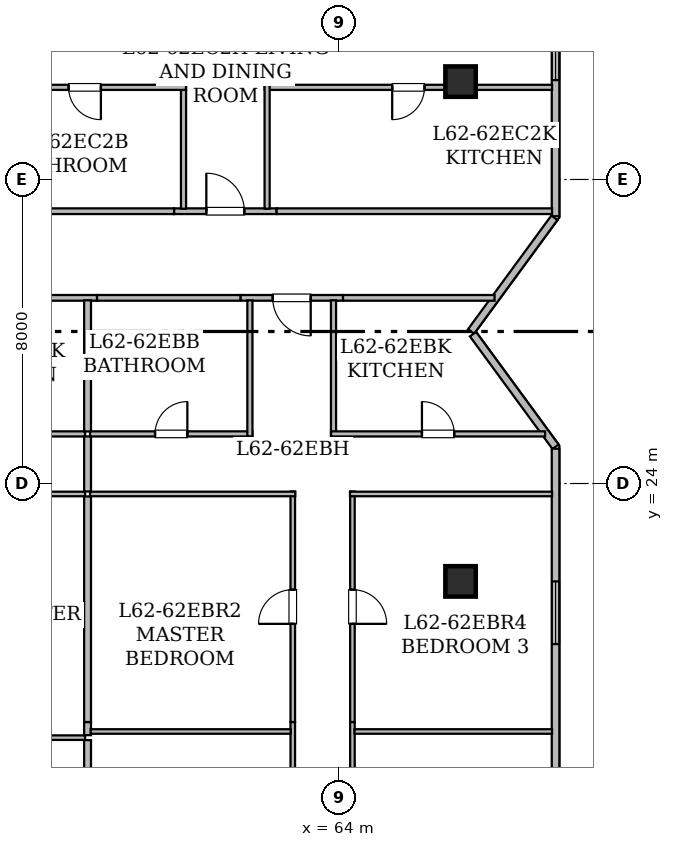
"""IFC4 building model, lengths in metres.
Left out: names, types, materials, properties, quantities, classifications, styles, units other than length and angle.
Written with IfcOpenShell. Run it as: python <this file> out.ifc"""

import sys

from ifc_helpers import new_model, si_unit, direction, frame, frame_2d, origin, origin_2d, place, context, subcontext, project, spatial, rectangle, hollow_rectangle, extrude, element, fill, save


model = new_model("IFC4")
c1 = context("Model", 3, precision=1e-05, world=origin(), true_north=direction((0.0, 1.0)))
c2 = subcontext(c1, "Body", "Model", "MODEL_VIEW")
j1 = project(units=[si_unit("LENGTHUNIT", "METRE"), si_unit("PLANEANGLEUNIT", "RADIAN")], contexts=[c1])
p1 = place(None, origin())
s1 = spatial("IfcSite", under=j1, at=p1, CompositionType="ELEMENT")
p2 = place(p1, origin())
s2 = spatial("IfcBuilding", under=s1, at=p2, CompositionType="ELEMENT")
p3 = place(p2, frame((0.0, 0.0, 242.75)))
s3 = spatial("IfcBuildingStorey", under=s2, at=p3, CompositionType="ELEMENT", Elevation=242.75)
for number, where, z_axis, x_axis in (
    (1, (67.2, 21.425, 0.0), (0.0, 0.0, 1.0), (1.0, 0.0, 0.0)),
    (2, (67.2, 34.575, 0.0), (0.0, 0.0, 1.0), (1.0, 0.0, 0.0)),
):
    element("IfcColumn", number, at=place(p3, frame(where, z_axis=z_axis, x_axis=x_axis)), inside=s3, PredefinedType="COLUMN", context=c2, shape_type="SweptSolid", body=[
        extrude(hollow_rectangle(XDim=0.8, YDim=0.8, WallThickness=0.04, at=origin_2d()), origin(), (0.0, 0.0, 1.0), 3.65),
    ])
p4 = place(p3, frame((69.7, 39.896, 0.0), z_axis=(0.0, 0.0, 1.0), x_axis=(0.0, -1.0, 0.0)))
e3 = element("IfcWall", 3, at=p4, inside=s3, PredefinedType="STANDARD", context=c2, shape_type="SweptSolid", body=[
    extrude(rectangle(XDim=8.863, YDim=0.2, at=frame_2d((4.432, 0.0))), origin(), (0.0, 0.0, 1.0), 3.43),
])
p5 = place(p4, frame((4.082, 0.0, 0.8)))
e4 = element("IfcOpeningElement", 4, at=p5, cuts=e3, PredefinedType="OPENING", context=c2, shape_type="SweptSolid", body=[
    extrude(rectangle(XDim=1.2, YDim=1.5, at=frame_2d((0.6, 0.75))), frame((0.0, 0.11, 0.0), z_axis=(0.0, -1.0, 0.0), x_axis=(1.0, 0.0, 0.0)), (0.0, 0.0, 1.0), 0.22),
])
p6 = place(p4, frame((1.513, 0.0, 0.85)))
e5 = element("IfcOpeningElement", 5, at=p6, cuts=e3, PredefinedType="OPENING", context=c2, shape_type="SweptSolid", body=[
    extrude(rectangle(XDim=1.65, YDim=1.55, at=frame_2d((0.825, 0.775))), frame((0.0, 0.11, 0.0), z_axis=(0.0, -1.0, 0.0), x_axis=(1.0, 0.0, 0.0)), (0.0, 0.0, 1.0), 0.22),
])
p7 = place(p3, frame((69.67, 30.992, 0.0), z_axis=(0.0, 0.0, 1.0), x_axis=(-0.591320870733, -0.806436375566, 0.0)))
e6 = element("IfcWall", 6, at=p7, inside=s3, PredefinedType="STANDARD", context=c2, shape_type="SweptSolid", body=[
    extrude(rectangle(XDim=3.71, YDim=0.2, at=frame_2d((1.855, 0.0))), origin(), (0.0, 0.0, 1.0), 3.43),
])
p8 = place(p3, frame((67.527, 27.931, 0.0), z_axis=(0.0, 0.0, 1.0), x_axis=(0.591248456881, -0.80648946815, 0.0)))
e7 = element("IfcWall", 7, at=p8, inside=s3, PredefinedType="STANDARD", context=c2, shape_type="SweptSolid", body=[
    extrude(rectangle(XDim=3.675, YDim=0.2, at=frame_2d((1.837, 0.0))), origin(), (0.0, 0.0, 1.0), 3.43),
])
p9 = place(p3, frame((69.7, 24.916, 0.0), z_axis=(0.0, 0.0, 1.0), x_axis=(0.0, -1.0, 0.0)))
e8 = element("IfcWall", 8, at=p9, inside=s3, PredefinedType="STANDARD", context=c2, shape_type="SweptSolid", body=[
    extrude(rectangle(XDim=8.875, YDim=0.2, at=frame_2d((4.438, 0.0))), origin(), (0.0, 0.0, 1.0), 3.43),
])
p10 = place(p9, frame((3.491, 0.0, 0.85)))
e9 = element("IfcOpeningElement", 9, at=p10, cuts=e8, PredefinedType="OPENING", context=c2, shape_type="SweptSolid", body=[
    extrude(rectangle(XDim=1.65, YDim=1.55, at=frame_2d((0.825, 0.775))), frame((0.0, 0.11, 0.0), z_axis=(0.0, -1.0, 0.0), x_axis=(1.0, 0.0, 0.0)), (0.0, 0.0, 1.0), 0.22),
])
p11 = place(p3, frame((57.634, 28.885, 0.0), z_axis=(0.0, 0.0, 1.0), x_axis=(-1.0, 0.0, 0.0)))
e10 = element("IfcWall", 10, at=p11, inside=s3, PredefinedType="STANDARD", context=c2, shape_type="SweptSolid", body=[
    extrude(rectangle(XDim=7.935, YDim=0.15, at=frame_2d((3.968, 0.0))), origin(), (0.0, 0.0, 1.0), 2.725),
])
p12 = place(p3, frame((64.107, 28.885, 0.0), z_axis=(0.0, 0.0, 1.0), x_axis=(-1.0, 0.0, 0.0)))
e11 = element("IfcWall", 11, at=p12, inside=s3, PredefinedType="STANDARD", context=c2, shape_type="SweptSolid", body=[
    extrude(rectangle(XDim=2.699, YDim=0.15, at=frame_2d((1.35, 0.0))), origin(), (0.0, 0.0, 1.0), 3.43),
])
p13 = place(p12, frame((0.85, 0.0, 0.0)))
e12 = element("IfcOpeningElement", 12, at=p13, cuts=e11, PredefinedType="OPENING", context=c2, shape_type="SweptSolid", body=[
    extrude(rectangle(XDim=1.0, YDim=2.15, at=frame_2d((0.5, 1.075))), frame((0.0, 0.085, 0.0), z_axis=(0.0, -1.0, 0.0), x_axis=(1.0, 0.0, 0.0)), (0.0, 0.0, 1.0), 0.17),
])
p14 = place(p3, frame((61.408, 28.885, 0.0), z_axis=(0.0, 0.0, 1.0), x_axis=(-1.0, 0.0, 0.0)))
e13 = element("IfcWall", 13, at=p14, inside=s3, PredefinedType="STANDARD", context=c2, shape_type="SweptSolid", body=[
    extrude(rectangle(XDim=3.774, YDim=0.15, at=frame_2d((1.887, 0.0))), origin(), (0.0, 0.0, 1.0), 3.43),
])
p15 = place(p3, frame((68.096, 28.885, 0.0), z_axis=(0.0, 0.0, 1.0), x_axis=(-1.0, 0.0, 0.0)))
e14 = element("IfcWall", 14, at=p15, inside=s3, PredefinedType="STANDARD", context=c2, shape_type="SweptSolid", body=[
    extrude(rectangle(XDim=3.989, YDim=0.15, at=frame_2d((1.995, 0.0))), origin(), (0.0, 0.0, 1.0), 2.887),
])
p16 = place(p3, frame((59.661, 31.165, 0.0), z_axis=(0.0, 0.0, 1.0), x_axis=(1.0, 0.0, 0.0)))
e15 = element("IfcWall", 15, at=p16, inside=s3, PredefinedType="STANDARD", context=c2, shape_type="SweptSolid", body=[
    extrude(rectangle(XDim=2.698, YDim=0.15, at=frame_2d((1.349, 0.0))), origin(), (0.0, 0.0, 1.0), 3.43),
])
p17 = place(p16, frame((0.849, 0.0, 0.0)))
e16 = element("IfcOpeningElement", 16, at=p17, cuts=e15, PredefinedType="OPENING", context=c2, shape_type="SweptSolid", body=[
    extrude(rectangle(XDim=1.0, YDim=2.15, at=frame_2d((0.5, 1.075))), frame((0.0, 0.085, 0.0), z_axis=(0.0, -1.0, 0.0), x_axis=(1.0, 0.0, 0.0)), (0.0, 0.0, 1.0), 0.17),
])
p18 = place(p3, frame((54.814, 31.165, 0.0), z_axis=(0.0, 0.0, 1.0), x_axis=(1.0, 0.0, 0.0)))
e17 = element("IfcWall", 17, at=p18, inside=s3, PredefinedType="STANDARD", context=c2, shape_type="SweptSolid", body=[
    extrude(rectangle(XDim=4.847, YDim=0.15, at=frame_2d((2.423, 0.0))), origin(), (0.0, 0.0, 1.0), 3.43),
])
p19 = place(p3, frame((62.359, 31.165, 0.0), z_axis=(0.0, 0.0, 1.0), x_axis=(1.0, 0.0, 0.0)))
e18 = element("IfcWall", 18, at=p19, inside=s3, PredefinedType="STANDARD", context=c2, shape_type="SweptSolid", body=[
    extrude(rectangle(XDim=7.249, YDim=0.15, at=frame_2d((3.625, 0.0))), origin(), (0.0, 0.0, 1.0), 2.887),
])
p20 = place(p3, frame((49.385, 25.305, 0.0), z_axis=(0.0, 0.0, 1.0), x_axis=(1.0, 0.0, 0.0)))
e19 = element("IfcWall", 19, at=p20, inside=s3, PredefinedType="PARTITIONING", context=c2, shape_type="SweptSolid", body=[
    extrude(rectangle(XDim=7.935, YDim=0.135, at=frame_2d((3.968, 0.0))), origin(), (0.0, 0.0, 1.0), 2.725),
])
p21 = place(p20, frame((3.542, 0.0, 0.0)))
e20 = element("IfcOpeningElement", 20, at=p21, cuts=e19, PredefinedType="OPENING", context=c2, shape_type="SweptSolid", body=[
    extrude(rectangle(XDim=0.85, YDim=2.1, at=frame_2d((0.425, 1.05))), frame((0.0, 0.077, 0.0), z_axis=(0.0, -1.0, 0.0), x_axis=(1.0, 0.0, 0.0)), (0.0, 0.0, 1.0), 0.155),
])
p22 = place(p3, frame((57.32, 23.725, 0.0), z_axis=(0.0, 0.0, 1.0), x_axis=(-1.0, 0.0, 0.0)))
e21 = element("IfcWall", 21, at=p22, inside=s3, PredefinedType="PARTITIONING", context=c2, shape_type="SweptSolid", body=[
    extrude(rectangle(XDim=7.1, YDim=0.12, at=frame_2d((3.55, 0.0))), origin(), (0.0, 0.0, 1.0), 2.725),
])
p23 = place(p22, frame((3.1, 0.0, 0.0)))
e22 = element("IfcOpeningElement", 22, at=p23, cuts=e21, PredefinedType="OPENING", context=c2, shape_type="SweptSolid", body=[
    extrude(rectangle(XDim=0.9, YDim=2.1, at=frame_2d((0.45, 1.05))), frame((0.0, 0.07, 0.0), z_axis=(0.0, -1.0, 0.0), x_axis=(1.0, 0.0, 0.0)), (0.0, 0.0, 1.0), 0.14),
])
p24 = place(p3, frame((57.385, 25.24, 0.0), z_axis=(0.0, 0.0, 1.0), x_axis=(0.0, -1.0, 0.0)))
e23 = element("IfcWall", 23, at=p24, inside=s3, PredefinedType="STANDARD", context=c2, shape_type="SweptSolid", body=[
    extrude(rectangle(XDim=1.45, YDim=0.18, at=frame_2d((0.725, 0.0))), origin(), (0.0, 0.0, 1.0), 3.43),
])
p25 = place(p3, frame((57.385, 28.82, 0.0), z_axis=(0.0, 0.0, 1.0), x_axis=(0.0, -1.0, 0.0)))
e24 = element("IfcWall", 24, at=p25, inside=s3, PredefinedType="STANDARD", context=c2, shape_type="SweptSolid", body=[
    extrude(rectangle(XDim=3.45, YDim=0.18, at=frame_2d((1.725, 0.0))), origin(), (0.0, 0.0, 1.0), 3.43),
])
p26 = place(p3, frame((50.339, 17.313, 0.0), z_axis=(0.0, 0.0, 1.0), x_axis=(1.0, 0.0, 0.0)))
e25 = element("IfcWall", 25, at=p26, inside=s3, PredefinedType="PARTITIONING", context=c2, shape_type="SweptSolid", body=[
    extrude(rectangle(XDim=6.981, YDim=0.12, at=frame_2d((3.49, 0.0))), origin(), (0.0, 0.0, 1.0), 2.725),
])
p27 = place(p3, frame((57.385, 17.248, 0.0), z_axis=(0.0, 0.0, 1.0), x_axis=(0.0, -1.0, 0.0)))
e26 = element("IfcWall", 26, at=p27, inside=s3, PredefinedType="STANDARD", context=c2, shape_type="SweptSolid", body=[
    extrude(rectangle(XDim=5.056, YDim=0.18, at=frame_2d((2.528, 0.0))), origin(), (0.0, 0.0, 1.0), 2.725),
])
p28 = place(p3, frame((57.385, 17.724, 0.0), z_axis=(0.0, 0.0, 1.0), x_axis=(0.0, -1.0, 0.0)))
e27 = element("IfcWall", 27, at=p28, inside=s3, PredefinedType="STANDARD", context=c2, shape_type="SweptSolid", body=[
    extrude(rectangle(XDim=0.346, YDim=0.18, at=frame_2d((0.173, 0.0))), origin(), (0.0, 0.0, 1.0), 3.43),
])
p29 = place(p3, frame((57.385, 23.66, 0.0), z_axis=(0.0, 0.0, 1.0), x_axis=(0.0, -1.0, 0.0)))
e28 = element("IfcWall", 28, at=p29, inside=s3, PredefinedType="STANDARD", context=c2, shape_type="SweptSolid", body=[
    extrude(rectangle(XDim=5.936, YDim=0.18, at=frame_2d((2.968, 0.0))), origin(), (0.0, 0.0, 1.0), 2.725),
])
p30 = place(p3, frame((57.45, 25.305, 0.0), z_axis=(0.0, 0.0, 1.0), x_axis=(1.0, 0.0, 0.0)))
e29 = element("IfcWall", 29, at=p30, inside=s3, PredefinedType="PARTITIONING", context=c2, shape_type="SweptSolid", body=[
    extrude(rectangle(XDim=4.272, YDim=0.135, at=frame_2d((2.136, 0.0))), origin(), (0.0, 0.0, 1.0), 3.43),
])
p31 = place(p30, frame((1.711, 0.0, 0.0)))
e30 = element("IfcOpeningElement", 30, at=p31, cuts=e29, PredefinedType="OPENING", context=c2, shape_type="SweptSolid", body=[
    extrude(rectangle(XDim=0.85, YDim=2.1, at=frame_2d((0.425, 1.05))), frame((0.0, 0.077, 0.0), z_axis=(0.0, -1.0, 0.0), x_axis=(1.0, 0.0, 0.0)), (0.0, 0.0, 1.0), 0.155),
])
for number, where, z_axis, x_axis in (
    (31, (61.657, 25.24, 0.0), (0.0, 0.0, 1.0), (0.0, 1.0, 0.0)),
    (32, (63.857, 28.82, 0.0), (0.0, 0.0, 1.0), (0.0, -1.0, 0.0)),
):
    element("IfcWall", number, at=place(p3, frame(where, z_axis=z_axis, x_axis=x_axis)), inside=s3, PredefinedType="PARTITIONING", context=c2, shape_type="SweptSolid", body=[
        extrude(rectangle(XDim=3.58, YDim=0.135, at=frame_2d((1.79, 0.0))), origin(), (0.0, 0.0, 1.0), 3.43),
    ])
p32 = place(p3, frame((63.792, 25.305, 0.0), z_axis=(0.0, 0.0, 1.0), x_axis=(1.0, 0.0, 0.0)))
e33 = element("IfcWall", 33, at=p32, inside=s3, PredefinedType="PARTITIONING", context=c2, shape_type="SweptSolid", body=[
    extrude(rectangle(XDim=5.633, YDim=0.135, at=frame_2d((2.816, 0.0))), origin(), (0.0, 0.0, 1.0), 2.887),
])
p33 = place(p32, frame((2.392, 0.0, 0.0)))
e34 = element("IfcOpeningElement", 34, at=p33, cuts=e33, PredefinedType="OPENING", context=c2, shape_type="SweptSolid", body=[
    extrude(rectangle(XDim=0.85, YDim=2.1, at=frame_2d((0.425, 1.05))), frame((0.0, 0.077, 0.0), z_axis=(0.0, -1.0, 0.0), x_axis=(1.0, 0.0, 0.0)), (0.0, 0.0, 1.0), 0.155),
])
p34 = place(p3, frame((62.785, 12.192, 0.0), z_axis=(0.0, 0.0, 1.0), x_axis=(0.0, 1.0, 0.0)))
e35 = element("IfcWall", 35, at=p34, inside=s3, PredefinedType="PARTITIONING", context=c2, shape_type="SweptSolid", body=[
    extrude(rectangle(XDim=5.532, YDim=0.12, at=frame_2d((2.766, 0.0))), origin(), (0.0, 0.0, 1.0), 2.725),
])
p35 = place(p34, frame((2.98, 0.0, 0.0)))
e36 = element("IfcOpeningElement", 36, at=p35, cuts=e35, PredefinedType="OPENING", context=c2, shape_type="SweptSolid", body=[
    extrude(rectangle(XDim=0.9, YDim=2.1, at=frame_2d((0.45, 1.05))), frame((0.0, 0.07, 0.0), z_axis=(0.0, -1.0, 0.0), x_axis=(1.0, 0.0, 0.0)), (0.0, 0.0, 1.0), 0.14),
])
p36 = place(p3, frame((62.785, 17.724, 0.0), z_axis=(0.0, 0.0, 1.0), x_axis=(0.0, 1.0, 0.0)))
e37 = element("IfcWall", 37, at=p36, inside=s3, PredefinedType="PARTITIONING", context=c2, shape_type="SweptSolid", body=[
    extrude(rectangle(XDim=6.066, YDim=0.12, at=frame_2d((3.033, 0.0))), origin(), (0.0, 0.0, 1.0), 2.725),
])
p37 = place(p36, frame((2.583, 0.0, 0.0)))
e38 = element("IfcOpeningElement", 38, at=p37, cuts=e37, PredefinedType="OPENING", context=c2, shape_type="SweptSolid", body=[
    extrude(rectangle(XDim=0.9, YDim=2.1, at=frame_2d((0.45, 1.05))), frame((0.0, 0.07, 0.0), z_axis=(0.0, -1.0, 0.0), x_axis=(1.0, 0.0, 0.0)), (0.0, 0.0, 1.0), 0.14),
])
p38 = place(p3, frame((62.85, 23.725, 0.0), z_axis=(0.0, 0.0, 1.0), x_axis=(-1.0, 0.0, 0.0)))
e39 = element("IfcWall", 39, at=p38, inside=s3, PredefinedType="PARTITIONING", context=c2, shape_type="SweptSolid", body=[
    extrude(rectangle(XDim=5.4, YDim=0.12, at=frame_2d((2.7, 0.0))), origin(), (0.0, 0.0, 1.0), 3.43),
])
p39 = place(p3, frame((64.355, 17.724, 0.0), z_axis=(0.0, 0.0, 1.0), x_axis=(0.0, -1.0, 0.0)))
e40 = element("IfcWall", 40, at=p39, inside=s3, PredefinedType="PARTITIONING", context=c2, shape_type="SweptSolid", body=[
    extrude(rectangle(XDim=5.532, YDim=0.12, at=frame_2d((2.766, 0.0))), origin(), (0.0, 0.0, 1.0), 2.887),
])
p40 = place(p39, frame((1.823, 0.0, 0.0)))
e41 = element("IfcOpeningElement", 41, at=p40, cuts=e40, PredefinedType="OPENING", context=c2, shape_type="SweptSolid", body=[
    extrude(rectangle(XDim=0.9, YDim=2.1, at=frame_2d((0.45, 1.05))), frame((0.0, 0.07, 0.0), z_axis=(0.0, -1.0, 0.0), x_axis=(1.0, 0.0, 0.0)), (0.0, 0.0, 1.0), 0.14),
])
p41 = place(p3, frame((64.355, 23.79, 0.0), z_axis=(0.0, 0.0, 1.0), x_axis=(0.0, -1.0, 0.0)))
e42 = element("IfcWall", 42, at=p41, inside=s3, PredefinedType="PARTITIONING", context=c2, shape_type="SweptSolid", body=[
    extrude(rectangle(XDim=6.066, YDim=0.12, at=frame_2d((3.033, 0.0))), origin(), (0.0, 0.0, 1.0), 2.725),
])
p42 = place(p41, frame((2.583, 0.0, 0.0)))
e43 = element("IfcOpeningElement", 43, at=p42, cuts=e42, PredefinedType="OPENING", context=c2, shape_type="SweptSolid", body=[
    extrude(rectangle(XDim=0.9, YDim=2.1, at=frame_2d((0.45, 1.05))), frame((0.0, 0.07, 0.0), z_axis=(0.0, -1.0, 0.0), x_axis=(1.0, 0.0, 0.0)), (0.0, 0.0, 1.0), 0.14),
])
p43 = place(p3, frame((69.608, 23.725, 0.0), z_axis=(0.0, 0.0, 1.0), x_axis=(-1.0, 0.0, 0.0)))
e44 = element("IfcWall", 44, at=p43, inside=s3, PredefinedType="PARTITIONING", context=c2, shape_type="SweptSolid", body=[
    extrude(rectangle(XDim=5.318, YDim=0.12, at=frame_2d((2.659, 0.0))), origin(), (0.0, 0.0, 1.0), 2.887),
])
p44 = place(p3, frame((57.467, 17.475, 0.0), z_axis=(0.0, 0.0, 1.0), x_axis=(1.0, 0.0, 0.0)))
e45 = element("IfcWall", 45, at=p44, inside=s3, PredefinedType="PARTITIONING", context=c2, shape_type="SweptSolid", body=[
    extrude(rectangle(XDim=5.264, YDim=0.12, at=frame_2d((2.632, 0.0))), origin(), (0.0, 0.0, 1.0), 3.43),
])
p45 = place(p3, frame((64.409, 17.475, 0.0), z_axis=(0.0, 0.0, 1.0), x_axis=(1.0, 0.0, 0.0)))
e46 = element("IfcWall", 46, at=p45, inside=s3, PredefinedType="PARTITIONING", context=c2, shape_type="SweptSolid", body=[
    extrude(rectangle(XDim=5.199, YDim=0.12, at=frame_2d((2.6, 0.0))), origin(), (0.0, 0.0, 1.0), 2.887),
])
p46 = place(p3, frame((59.91, 31.23, 0.0), z_axis=(0.0, 0.0, 1.0), x_axis=(0.0, 1.0, 0.0)))
e47 = element("IfcWall", 47, at=p46, inside=s3, PredefinedType="PARTITIONING", context=c2, shape_type="SweptSolid", body=[
    extrude(rectangle(XDim=3.259, YDim=0.135, at=frame_2d((1.629, 0.0))), origin(), (0.0, 0.0, 1.0), 3.107),
])
p47 = place(p3, frame((59.975, 34.424, 0.0), z_axis=(0.0, 0.0, 1.0), x_axis=(-1.0, 0.0, 0.0)))
e48 = element("IfcWall", 48, at=p47, inside=s3, PredefinedType="PARTITIONING", context=c2, shape_type="SweptSolid", body=[
    extrude(rectangle(XDim=5.328, YDim=0.135, at=frame_2d((2.664, 0.0))), origin(), (0.0, 0.0, 1.0), 3.43),
])
p48 = place(p47, frame((2.239, 0.0, 0.0)))
e49 = element("IfcOpeningElement", 49, at=p48, cuts=e48, PredefinedType="OPENING", context=c2, shape_type="SweptSolid", body=[
    extrude(rectangle(XDim=0.85, YDim=2.1, at=frame_2d((0.425, 1.05))), frame((0.0, 0.077, 0.0), z_axis=(0.0, -1.0, 0.0), x_axis=(1.0, 0.0, 0.0)), (0.0, 0.0, 1.0), 0.155),
])
p49 = place(p3, frame((69.608, 34.424, 0.0), z_axis=(0.0, 0.0, 1.0), x_axis=(-1.0, 0.0, 0.0)))
e50 = element("IfcWall", 50, at=p49, inside=s3, PredefinedType="PARTITIONING", context=c2, shape_type="SweptSolid", body=[
    extrude(rectangle(XDim=7.563, YDim=0.135, at=frame_2d((3.781, 0.0))), origin(), (0.0, 0.0, 1.0), 2.725),
])
p50 = place(p49, frame((3.357, 0.0, 0.0)))
e51 = element("IfcOpeningElement", 51, at=p50, cuts=e50, PredefinedType="OPENING", context=c2, shape_type="SweptSolid", body=[
    extrude(rectangle(XDim=0.85, YDim=2.1, at=frame_2d((0.425, 1.05))), frame((0.0, 0.077, 0.0), z_axis=(0.0, -1.0, 0.0), x_axis=(1.0, 0.0, 0.0)), (0.0, 0.0, 1.0), 0.155),
])
p51 = place(p3, frame((62.11, 34.489, 0.0), z_axis=(0.0, 0.0, 1.0), x_axis=(0.0, -1.0, 0.0)))
e52 = element("IfcWall", 52, at=p51, inside=s3, PredefinedType="PARTITIONING", context=c2, shape_type="SweptSolid", body=[
    extrude(rectangle(XDim=3.259, YDim=0.135, at=frame_2d((1.629, 0.0))), origin(), (0.0, 0.0, 1.0), 3.107),
])
p52 = place(p10, origin())
e53 = element("IfcWindow", 53, at=p52, inside=s3, PartitioningType="SINGLE_PANEL", PredefinedType="WINDOW", context=c2, shape_type="SweptSolid", body=[
    extrude(rectangle(XDim=1.65, YDim=1.55, at=frame_2d((0.825, 0.775))), frame((0.0, 0.03, 0.0), z_axis=(0.0, -1.0, 0.0), x_axis=(1.0, 0.0, 0.0)), (0.0, 0.0, 1.0), 0.06),
])
fill(e9, e53)
p53 = place(p5, origin())
e54 = element("IfcWindow", 54, at=p53, inside=s3, PartitioningType="SINGLE_PANEL", PredefinedType="WINDOW", context=c2, shape_type="SweptSolid", body=[
    extrude(rectangle(XDim=1.2, YDim=1.5, at=frame_2d((0.6, 0.75))), frame((0.0, 0.03, 0.0), z_axis=(0.0, -1.0, 0.0), x_axis=(1.0, 0.0, 0.0)), (0.0, 0.0, 1.0), 0.06),
])
fill(e4, e54)
p54 = place(p13, origin())
e55 = element("IfcDoor", 55, at=p54, inside=s3, OperationType="SINGLE_SWING_LEFT", PredefinedType="DOOR", context=c2, shape_type="SweptSolid", body=[
    extrude(rectangle(XDim=1.0, YDim=2.15, at=frame_2d((0.5, 1.075))), frame((0.0, 0.025, 0.0), z_axis=(0.0, -1.0, 0.0), x_axis=(1.0, 0.0, 0.0)), (0.0, 0.0, 1.0), 0.05),
])
fill(e12, e55)
p55 = place(p17, origin())
e56 = element("IfcDoor", 56, at=p55, inside=s3, OperationType="SINGLE_SWING_LEFT", PredefinedType="DOOR", context=c2, shape_type="SweptSolid", body=[
    extrude(rectangle(XDim=1.0, YDim=2.15, at=frame_2d((0.5, 1.075))), frame((0.0, 0.025, 0.0), z_axis=(0.0, -1.0, 0.0), x_axis=(1.0, 0.0, 0.0)), (0.0, 0.0, 1.0), 0.05),
])
fill(e16, e56)
p56 = place(p31, origin())
e57 = element("IfcDoor", 57, at=p56, inside=s3, OperationType="SINGLE_SWING_RIGHT", PredefinedType="DOOR", context=c2, shape_type="SweptSolid", body=[
    extrude(rectangle(XDim=0.85, YDim=2.1, at=frame_2d((0.425, 1.05))), frame((0.0, 0.025, 0.0), z_axis=(0.0, -1.0, 0.0), x_axis=(1.0, 0.0, 0.0)), (0.0, 0.0, 1.0), 0.05),
])
fill(e30, e57)
p57 = place(p33, origin())
e58 = element("IfcDoor", 58, at=p57, inside=s3, OperationType="SINGLE_SWING_LEFT", PredefinedType="DOOR", context=c2, shape_type="SweptSolid", body=[
    extrude(rectangle(XDim=0.85, YDim=2.1, at=frame_2d((0.425, 1.05))), frame((0.0, 0.025, 0.0), z_axis=(0.0, -1.0, 0.0), x_axis=(1.0, 0.0, 0.0)), (0.0, 0.0, 1.0), 0.05),
])
fill(e34, e58)
p58 = place(p37, origin())
e59 = element("IfcDoor", 59, at=p58, inside=s3, OperationType="SINGLE_SWING_LEFT", PredefinedType="DOOR", context=c2, shape_type="SweptSolid", body=[
    extrude(rectangle(XDim=0.9, YDim=2.1, at=frame_2d((0.45, 1.05))), frame((0.0, 0.025, 0.0), z_axis=(0.0, -1.0, 0.0), x_axis=(1.0, 0.0, 0.0)), (0.0, 0.0, 1.0), 0.05),
])
fill(e38, e59)
p59 = place(p42, origin())
e60 = element("IfcDoor", 60, at=p59, inside=s3, OperationType="SINGLE_SWING_RIGHT", PredefinedType="DOOR", context=c2, shape_type="SweptSolid", body=[
    extrude(rectangle(XDim=0.9, YDim=2.1, at=frame_2d((0.45, 1.05))), frame((0.0, 0.025, 0.0), z_axis=(0.0, -1.0, 0.0), x_axis=(1.0, 0.0, 0.0)), (0.0, 0.0, 1.0), 0.05),
])
fill(e43, e60)
p60 = place(p48, origin())
e61 = element("IfcDoor", 61, at=p60, inside=s3, OperationType="SINGLE_SWING_LEFT", PredefinedType="DOOR", context=c2, shape_type="SweptSolid", body=[
    extrude(rectangle(XDim=0.85, YDim=2.1, at=frame_2d((0.425, 1.05))), frame((0.0, 0.025, 0.0), z_axis=(0.0, -1.0, 0.0), x_axis=(1.0, 0.0, 0.0)), (0.0, 0.0, 1.0), 0.05),
])
fill(e49, e61)
p61 = place(p50, origin())
e62 = element("IfcDoor", 62, at=p61, inside=s3, OperationType="SINGLE_SWING_RIGHT", PredefinedType="DOOR", context=c2, shape_type="SweptSolid", body=[
    extrude(rectangle(XDim=0.85, YDim=2.1, at=frame_2d((0.425, 1.05))), frame((0.0, 0.025, 0.0), z_axis=(0.0, -1.0, 0.0), x_axis=(1.0, 0.0, 0.0)), (0.0, 0.0, 1.0), 0.05),
])
fill(e51, e62)
save(model, sys.argv[1])
